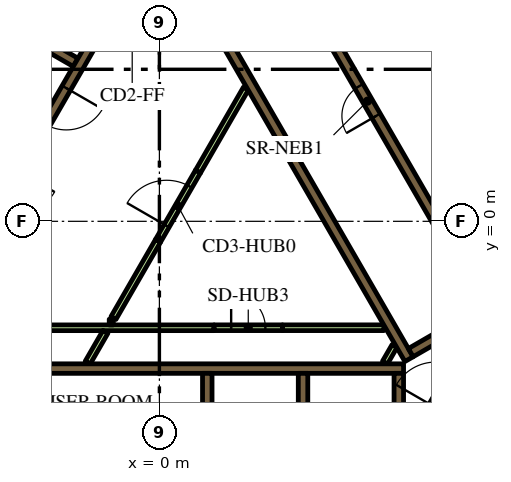
"""IFC4 building model, lengths in metres.
Left out: names, types, materials, properties, quantities, classifications, styles, units other than length and angle.
Written with IfcOpenShell. Run it as: python <this file> out.ifc"""

import sys

from ifc_helpers import new_model, si_unit, direction, frame, frame_2d, origin, place, context, subcontext, project, spatial, polyline, rectangle, outline, extrude, element, fill, save


model = new_model("IFC4")
c1 = context("Model", 3, precision=1e-05, world=origin(), true_north=direction((0.0, 1.0)))
c2 = subcontext(c1, "Body", "Model", "MODEL_VIEW")
j1 = project(units=[si_unit("LENGTHUNIT", "METRE"), si_unit("PLANEANGLEUNIT", "RADIAN")], contexts=[c1])
p1 = place(None, origin())
s1 = spatial("IfcSite", under=j1, at=p1, CompositionType="ELEMENT")
p2 = place(p1, origin())
s2 = spatial("IfcBuilding", under=s1, at=p2, CompositionType="ELEMENT")
p3 = place(p2, frame((0.0, 0.0, 58.8)))
s3 = spatial("IfcBuildingStorey", under=s2, at=p3, CompositionType="ELEMENT", Elevation=58.8)
p4 = place(p3, frame((6.776, 13.364, 0.0), z_axis=(0.0, 0.0, 1.0), x_axis=(0.500004177138, -0.8660229921, 0.0)))
e1 = element("IfcWall", 1, at=p4, inside=s3, PredefinedType="SOLIDWALL", context=c2, shape_type="SweptSolid", body=[
    extrude(rectangle(XDim=20.204, YDim=0.9, at=frame_2d((10.102, 0.0))), origin(), (0.0, 0.0, 1.0), 3.9),
])
p5 = place(p3, frame((-6.19, -3.875, 0.0), z_axis=(0.0, 0.0, 1.0), x_axis=(1.0, 0.0, 0.0)))
e2 = element("IfcWall", 2, at=p5, inside=s3, PredefinedType="SOLIDWALL", context=c2, shape_type="SweptSolid", body=[
    extrude(rectangle(XDim=12.615, YDim=0.25, at=frame_2d((6.307, 0.0))), origin(), (0.0, 0.0, 1.0), 3.9),
])
p6 = place(p3, frame((6.3, -7.268, 0.0), z_axis=(0.0, 0.0, 1.0), x_axis=(0.0, 1.0, 0.0)))
e3 = element("IfcWall", 3, at=p6, inside=s3, PredefinedType="SOLIDWALL", context=c2, shape_type="SweptSolid", body=[
    extrude(rectangle(XDim=3.268, YDim=0.25, at=frame_2d((1.634, 0.0))), origin(), (0.0, 0.0, 1.0), 3.9),
])
for number, where, z_axis, x_axis in (
    (4, (3.78, -4.0, 0.0), (0.0, 0.0, 1.0), (0.0, -1.0, 0.0)),
    (5, (1.26, -4.0, 0.0), (0.0, 0.0, 1.0), (0.0, -1.0, 0.0)),
):
    element("IfcWall", number, at=place(p3, frame(where, z_axis=z_axis, x_axis=x_axis)), inside=s3, PredefinedType="SOLIDWALL", context=c2, shape_type="SweptSolid", body=[
        extrude(rectangle(XDim=2.2, YDim=0.25, at=frame_2d((1.1, 0.0))), origin(), (0.0, 0.0, 1.0), 3.9),
    ])
p7 = place(p3, origin())
e6 = element("IfcWall", 6, at=p7, inside=s3, PredefinedType="SOLIDWALL", context=c2, shape_type="SweptSolid", body=[
    extrude(outline(polyline([(0.335, 6.925), (0.335, 6.925), (0.335, 7.075), (0.335, 7.075), (0.335, 7.075), (0.245, 7.075), (0.079, 7.363), (0.035, 7.439), (0.252, 7.564), (0.377, 7.348), (6.552, -3.348), (6.677, -3.564), (6.46, -3.689), (4.897, -0.981), (0.332, 6.925), (0.335, 6.925), (0.335, 6.925)])), origin(), (0.0, 0.0, 1.0), 3.9),
])
p8 = place(p3, frame((9.352, -1.875, 0.0), z_axis=(0.0, 0.0, 1.0), x_axis=(-0.866024844342, -0.500000968981, 0.0)))
e7 = element("IfcWall", 7, at=p8, inside=s3, PredefinedType="SOLIDWALL", context=c2, shape_type="SweptSolid", body=[
    extrude(rectangle(XDim=3.162, YDim=0.25, at=frame_2d((1.581, 0.0))), origin(), (0.0, 0.0, 1.0), 3.9),
])
p9 = place(p3, frame((-8.06, -1.311, 0.0), z_axis=(0.0, 0.0, 1.0), x_axis=(0.50000273126, 0.866023826885, 0.0)))
e8 = element("IfcWall", 8, at=p9, inside=s3, PredefinedType="SOLIDWALL", context=c2, shape_type="SweptSolid", body=[
    extrude(rectangle(XDim=10.33, YDim=0.25, at=frame_2d((5.165, 0.0))), origin(), (0.0, 0.0, 1.0), 3.9),
])
p10 = place(p3, frame((-2.204, 4.182, 0.0), z_axis=(0.0, 0.0, 1.0), x_axis=(-0.866008176907, 0.50002983664, 0.0)))
e9 = element("IfcWall", 9, at=p10, inside=s3, PredefinedType="SOLIDWALL", context=c2, shape_type="SweptSolid", body=[
    extrude(rectangle(XDim=2.2, YDim=0.25, at=frame_2d((1.1, 0.0))), origin(), (0.0, 0.0, 1.0), 3.9),
])
p11 = place(p3, frame((-6.086, -2.801, 0.0), z_axis=(0.0, 0.0, 1.0), x_axis=(1.0, 0.0, 0.0)))
e10 = element("IfcWall", 10, at=p11, inside=s3, PredefinedType="PARTITIONING", context=c2, shape_type="SweptSolid", body=[
    extrude(rectangle(XDim=7.524, YDim=0.15, at=frame_2d((3.762, 0.0))), origin(), (0.0, 0.0, 1.0), 2.75),
])
p12 = place(p3, frame((-1.887, -3.718, 0.0), z_axis=(0.0, 0.0, 1.0), x_axis=(0.499842898591, 0.866116087328, 0.0)))
e11 = element("IfcWall", 11, at=p12, inside=s3, PredefinedType="PARTITIONING", context=c2, shape_type="SweptSolid", body=[
    extrude(rectangle(XDim=0.936, YDim=0.15, at=frame_2d((0.468, 0.0))), origin(), (0.0, 0.0, 1.0), 2.75),
])
p13 = place(p3, frame((-1.212, -2.651, 0.0), z_axis=(0.0, 0.0, 1.0), x_axis=(-1.0, 0.0, 0.0)))
e12 = element("IfcWall", 12, at=p13, inside=s3, PredefinedType="PARTITIONING", context=c2, shape_type="SweptSolid", body=[
    extrude(rectangle(XDim=0.108, YDim=0.15, at=frame_2d((0.054, 0.0))), origin(), (0.0, 0.0, 1.0), 2.75),
])
p14 = place(p3, frame((-1.208, -2.544, 0.0), z_axis=(0.0, 0.0, 1.0), x_axis=(0.499995339376, 0.86602809458, 0.0)))
e13 = element("IfcWall", 13, at=p14, inside=s3, PredefinedType="PARTITIONING", context=c2, shape_type="SweptSolid", body=[
    extrude(rectangle(XDim=2.349, YDim=0.15, at=frame_2d((1.175, 0.0))), origin(), (0.0, 0.0, 1.0), 2.75),
])
p15 = place(p3, frame((5.936, -3.718, 0.0), z_axis=(0.0, 0.0, 1.0), x_axis=(0.499890179513, 0.866088799389, 0.0)))
e14 = element("IfcWall", 14, at=p15, inside=s3, PredefinedType="PARTITIONING", context=c2, shape_type="SweptSolid", body=[
    extrude(rectangle(XDim=0.504, YDim=0.15, at=frame_2d((0.252, 0.0))), origin(), (0.0, 0.0, 1.0), 2.75),
])
p16 = place(p3, frame((3.238, -2.8, 0.0), z_axis=(0.0, 0.0, 1.0), x_axis=(1.0, 0.0, 0.0)))
e15 = element("IfcWall", 15, at=p16, inside=s3, PredefinedType="PARTITIONING", context=c2, shape_type="SweptSolid", body=[
    extrude(rectangle(XDim=2.672, YDim=0.15, at=frame_2d((1.336, 0.0))), origin(), (0.0, 0.0, 1.0), 2.75),
])
p17 = place(p3, frame((1.016, 1.309, 0.0), z_axis=(0.0, 0.0, 1.0), x_axis=(0.49998231768, 0.866035612436, 0.0)))
e16 = element("IfcWall", 16, at=p17, inside=s3, PredefinedType="PARTITIONING", context=c2, shape_type="SweptSolid", body=[
    extrude(rectangle(XDim=2.521, YDim=0.15, at=frame_2d((1.26, 0.0))), origin(), (0.0, 0.0, 1.0), 2.75),
])
p18 = place(p3, frame((11.553, -0.46, 0.0), z_axis=(0.0, 0.0, 1.0), x_axis=(-0.500006514828, 0.866021642414, 0.0)))
e17 = element("IfcWall", 17, at=p18, inside=s3, PredefinedType="SOLIDWALL", context=c2, shape_type="SweptSolid", body=[
    extrude(rectangle(XDim=12.35, YDim=0.25, at=frame_2d((6.175, 0.0))), origin(), (0.0, 0.0, 1.0), 3.9),
])
p19 = place(p18, frame((0.585, 0.0, 0.0)))
e18 = element("IfcOpeningElement", 18, at=p19, cuts=e17, PredefinedType="OPENING", context=c2, shape_type="SweptSolid", body=[
    extrude(rectangle(XDim=1.1, YDim=2.1, at=frame_2d((0.55, 1.05))), frame((0.0, 0.135, 0.0), z_axis=(0.0, -1.0, 0.0), x_axis=(1.0, 0.0, 0.0)), (0.0, 0.0, 1.0), 0.27),
])
p20 = place(p18, frame((3.105, 0.0, 0.0)))
e19 = element("IfcOpeningElement", 19, at=p20, cuts=e17, PredefinedType="OPENING", context=c2, shape_type="SweptSolid", body=[
    extrude(rectangle(XDim=1.1, YDim=2.1, at=frame_2d((0.55, 1.05))), frame((0.0, 0.135, 0.0), z_axis=(0.0, -1.0, 0.0), x_axis=(1.0, 0.0, 0.0)), (0.0, 0.0, 1.0), 0.27),
])
p21 = place(p18, frame((5.625, 0.0, 0.0)))
e20 = element("IfcOpeningElement", 20, at=p21, cuts=e17, PredefinedType="OPENING", context=c2, shape_type="SweptSolid", body=[
    extrude(rectangle(XDim=1.1, YDim=2.1, at=frame_2d((0.55, 1.05))), frame((0.0, 0.135, 0.0), z_axis=(0.0, -1.0, 0.0), x_axis=(1.0, 0.0, 0.0)), (0.0, 0.0, 1.0), 0.27),
])
p22 = place(p3, frame((8.565, -2.185, 0.0), z_axis=(0.0, 0.0, 1.0), x_axis=(-0.499997954832, 0.866026584559, 0.0)))
e21 = element("IfcWall", 21, at=p22, inside=s3, PredefinedType="SOLIDWALL", context=c2, shape_type="SweptSolid", body=[
    extrude(rectangle(XDim=12.35, YDim=0.25, at=frame_2d((6.175, 0.0))), origin(), (0.0, 0.0, 1.0), 3.9),
])
p23 = place(p22, frame((5.725, 0.0, 0.0)))
e22 = element("IfcOpeningElement", 22, at=p23, cuts=e21, PredefinedType="OPENING", context=c2, shape_type="SweptSolid", body=[
    extrude(rectangle(XDim=0.9, YDim=2.1, at=frame_2d((0.45, 1.05))), frame((0.0, 0.135, 0.0), z_axis=(0.0, -1.0, 0.0), x_axis=(1.0, 0.0, 0.0)), (0.0, 0.0, 1.0), 0.27),
])
p24 = place(p3, frame((-0.898, 6.194, 0.0), z_axis=(0.0, 0.0, 1.0), x_axis=(-0.499996202215, -0.866027596426, 0.0)))
e23 = element("IfcWall", 23, at=p24, inside=s3, PredefinedType="SOLIDWALL", context=c2, shape_type="SweptSolid", body=[
    extrude(rectangle(XDim=9.83, YDim=0.25, at=frame_2d((4.915, 0.0))), origin(), (0.0, 0.0, 1.0), 3.9),
])
p25 = place(p24, frame((0.585, 0.0, 0.0)))
e24 = element("IfcOpeningElement", 24, at=p25, cuts=e23, PredefinedType="OPENING", context=c2, shape_type="SweptSolid", body=[
    extrude(rectangle(XDim=1.1, YDim=2.1, at=frame_2d((0.55, 1.05))), frame((0.0, 0.135, 0.0), z_axis=(0.0, -1.0, 0.0), x_axis=(1.0, 0.0, 0.0)), (0.0, 0.0, 1.0), 0.27),
])
p26 = place(p24, frame((3.105, 0.0, 0.0)))
e25 = element("IfcOpeningElement", 25, at=p26, cuts=e23, PredefinedType="OPENING", context=c2, shape_type="SweptSolid", body=[
    extrude(rectangle(XDim=1.1, YDim=2.1, at=frame_2d((0.55, 1.05))), frame((0.0, 0.135, 0.0), z_axis=(0.0, -1.0, 0.0), x_axis=(1.0, 0.0, 0.0)), (0.0, 0.0, 1.0), 0.27),
])
p27 = place(p24, frame((5.625, 0.0, 0.0)))
e26 = element("IfcOpeningElement", 26, at=p27, cuts=e23, PredefinedType="OPENING", context=c2, shape_type="SweptSolid", body=[
    extrude(rectangle(XDim=1.1, YDim=2.1, at=frame_2d((0.55, 1.05))), frame((0.0, 0.135, 0.0), z_axis=(0.0, -1.0, 0.0), x_axis=(1.0, 0.0, 0.0)), (0.0, 0.0, 1.0), 0.27),
])
p28 = place(p24, frame((8.145, 0.0, 0.0)))
e27 = element("IfcOpeningElement", 27, at=p28, cuts=e23, PredefinedType="OPENING", context=c2, shape_type="SweptSolid", body=[
    extrude(rectangle(XDim=1.1, YDim=2.1, at=frame_2d((0.55, 1.05))), frame((0.0, 0.135, 0.0), z_axis=(0.0, -1.0, 0.0), x_axis=(1.0, 0.0, 0.0)), (0.0, 0.0, 1.0), 0.27),
])
p29 = place(p3, frame((7.048, -5.292, 0.0), z_axis=(0.0, 0.0, 1.0), x_axis=(0.49994051562, 0.866059744384, 0.0)))
e28 = element("IfcWall", 28, at=p29, inside=s3, PredefinedType="SOLIDWALL", context=c2, shape_type="SweptSolid", body=[
    extrude(rectangle(XDim=2.1, YDim=0.4, at=frame_2d((1.05, 0.0))), origin(), (0.0, 0.0, 1.0), 3.9),
])
p30 = place(p29, frame((0.45, 0.0, 0.0)))
e29 = element("IfcOpeningElement", 29, at=p30, cuts=e28, PredefinedType="OPENING", context=c2, shape_type="SweptSolid", body=[
    extrude(rectangle(XDim=1.2, YDim=2.1, at=frame_2d((0.6, 1.05))), frame((0.0, 0.21, 0.0), z_axis=(0.0, -1.0, 0.0), x_axis=(1.0, 0.0, 0.0)), (0.0, 0.0, 1.0), 0.42),
])
p31 = place(p3, frame((-0.034, -0.509, 0.0), z_axis=(0.0, 0.0, 1.0), x_axis=(0.49994051562, 0.866059744384, 0.0)))
e30 = element("IfcWall", 30, at=p31, inside=s3, PredefinedType="PARTITIONING", context=c2, shape_type="SweptSolid", body=[
    extrude(rectangle(XDim=2.1, YDim=0.15, at=frame_2d((1.05, 0.0))), origin(), (0.0, 0.0, 1.0), 2.75),
])
p32 = place(p31, frame((0.45, 0.0, 0.0)))
e31 = element("IfcOpeningElement", 31, at=p32, cuts=e30, PredefinedType="OPENING", context=c2, shape_type="SweptSolid", body=[
    extrude(rectangle(XDim=1.2, YDim=2.1, at=frame_2d((0.6, 1.05))), frame((0.0, 0.085, 0.0), z_axis=(0.0, -1.0, 0.0), x_axis=(1.0, 0.0, 0.0)), (0.0, 0.0, 1.0), 0.17),
])
p33 = place(p3, frame((1.438, -2.8, 0.0), z_axis=(0.0, 0.0, 1.0), x_axis=(1.0, 0.0, 0.0)))
e32 = element("IfcWall", 32, at=p33, inside=s3, PredefinedType="PARTITIONING", context=c2, shape_type="SweptSolid", body=[
    extrude(rectangle(XDim=1.8, YDim=0.15, at=frame_2d((0.9, 0.0))), origin(), (0.0, 0.0, 1.0), 2.75),
])
p34 = place(p33, frame((0.45, 0.0, 0.0)))
e33 = element("IfcOpeningElement", 33, at=p34, cuts=e32, PredefinedType="OPENING", context=c2, shape_type="SweptSolid", body=[
    extrude(rectangle(XDim=0.9, YDim=2.1, at=frame_2d((0.45, 1.05))), frame((0.0, 0.085, 0.0), z_axis=(0.0, -1.0, 0.0), x_axis=(1.0, 0.0, 0.0)), (0.0, 0.0, 1.0), 0.17),
])
p35 = place(p3, frame((6.163, 18.475, 0.0), z_axis=(0.0, 0.0, 1.0), x_axis=(0.500001317485, -0.866024643133, 0.0)))
e34 = element("IfcWall", 34, at=p35, inside=s3, PredefinedType="PARTITIONING", context=c2, shape_type="SweptSolid", body=[
    extrude(rectangle(XDim=25.767, YDim=0.15, at=frame_2d((12.883, 0.0))), origin(), (0.0, 0.0, 1.0), 2.75),
])
p36 = place(p35, frame((24.586, 0.0, 0.0)))
e35 = element("IfcOpeningElement", 35, at=p36, cuts=e34, PredefinedType="OPENING", context=c2, shape_type="SweptSolid", body=[
    extrude(rectangle(XDim=1.0, YDim=2.1, at=frame_2d((0.5, 1.05))), frame((0.0, 0.085, 0.0), z_axis=(0.0, -1.0, 0.0), x_axis=(1.0, 0.0, 0.0)), (0.0, 0.0, 1.0), 0.17),
])
p37 = place(p35, frame((13.144, 0.0, 0.0)))
e36 = element("IfcOpeningElement", 36, at=p37, cuts=e34, PredefinedType="OPENING", context=c2, shape_type="SweptSolid", body=[
    extrude(rectangle(XDim=1.0, YDim=2.1, at=frame_2d((0.5, 1.05))), frame((0.0, 0.085, 0.0), z_axis=(0.0, -1.0, 0.0), x_axis=(1.0, 0.0, 0.0)), (0.0, 0.0, 1.0), 0.17),
])
p38 = place(p35, frame((11.692, 0.0, 0.0)))
e37 = element("IfcOpeningElement", 37, at=p38, cuts=e34, PredefinedType="OPENING", context=c2, shape_type="SweptSolid", body=[
    extrude(rectangle(XDim=1.0, YDim=2.1, at=frame_2d((0.5, 1.05))), frame((0.0, 0.085, 0.0), z_axis=(0.0, -1.0, 0.0), x_axis=(1.0, 0.0, 0.0)), (0.0, 0.0, 1.0), 0.17),
])
p39 = place(p35, frame((0.572, 0.0, 0.0)))
e38 = element("IfcOpeningElement", 38, at=p39, cuts=e34, PredefinedType="OPENING", context=c2, shape_type="SweptSolid", body=[
    extrude(rectangle(XDim=1.0, YDim=2.1, at=frame_2d((0.5, 1.05))), frame((0.0, 0.085, 0.0), z_axis=(0.0, -1.0, 0.0), x_axis=(1.0, 0.0, 0.0)), (0.0, 0.0, 1.0), 0.17),
])
p40 = place(p23, origin())
e39 = element("IfcDoor", 39, at=p40, inside=s3, OperationType="SINGLE_SWING_LEFT", PredefinedType="DOOR", context=c2, shape_type="SweptSolid", body=[
    extrude(rectangle(XDim=0.9, YDim=2.1, at=frame_2d((0.45, 1.05))), frame((0.0, 0.025, 0.0), z_axis=(0.0, -1.0, 0.0), x_axis=(1.0, 0.0, 0.0)), (0.0, 0.0, 1.0), 0.05),
])
fill(e22, e39)
p41 = place(p26, origin())
e40 = element("IfcDoor", 40, at=p41, inside=s3, OperationType="DOUBLE_DOOR_SLIDING", PredefinedType="DOOR", context=c2, shape_type="SweptSolid", body=[
    extrude(rectangle(XDim=1.1, YDim=2.1, at=frame_2d((0.55, 1.05))), frame((0.0, 0.025, 0.0), z_axis=(0.0, -1.0, 0.0), x_axis=(1.0, 0.0, 0.0)), (0.0, 0.0, 1.0), 0.05),
])
fill(e25, e40)
p42 = place(p32, origin())
e41 = element("IfcDoor", 41, at=p42, inside=s3, OperationType="SINGLE_SWING_LEFT", PredefinedType="DOOR", context=c2, shape_type="SweptSolid", body=[
    extrude(rectangle(XDim=1.2, YDim=2.1, at=frame_2d((0.6, 1.05))), frame((0.0, 0.025, 0.0), z_axis=(0.0, -1.0, 0.0), x_axis=(1.0, 0.0, 0.0)), (0.0, 0.0, 1.0), 0.05),
])
fill(e31, e41)
p43 = place(p34, origin())
e42 = element("IfcDoor", 42, at=p43, inside=s3, OperationType="SINGLE_SWING_LEFT", PredefinedType="DOOR", context=c2, shape_type="SweptSolid", body=[
    extrude(rectangle(XDim=0.9, YDim=2.1, at=frame_2d((0.45, 1.05))), frame((0.0, 0.025, 0.0), z_axis=(0.0, -1.0, 0.0), x_axis=(1.0, 0.0, 0.0)), (0.0, 0.0, 1.0), 0.05),
])
fill(e33, e42)
save(model, sys.argv[1])
